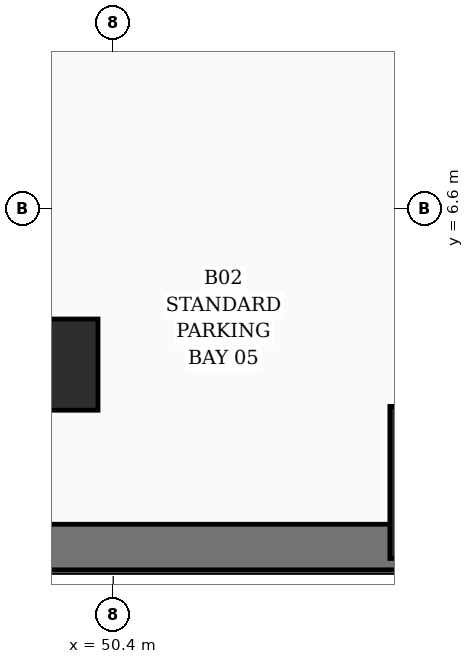
"""IFC4 building model, lengths in metres.
Left out: names, types, materials, properties, quantities, classifications, styles, units other than length and angle.
Written with IfcOpenShell. Run it as: python <this file> out.ifc"""

import sys

from ifc_helpers import new_model, si_unit, direction, frame, frame_2d, origin, origin_2d, place, context, subcontext, project, spatial, rectangle, circle, extrude, element, save


model = new_model("IFC4")
c1 = context("Model", 3, precision=1e-05, world=origin(), true_north=direction((0.0, 1.0)))
c2 = subcontext(c1, "Body", "Model", "MODEL_VIEW")
j1 = project(units=[si_unit("LENGTHUNIT", "METRE"), si_unit("PLANEANGLEUNIT", "RADIAN")], contexts=[c1])
p1 = place(None, origin())
s1 = spatial("IfcSite", under=j1, at=p1, CompositionType="ELEMENT")
p2 = place(p1, origin())
s2 = spatial("IfcBuilding", under=s1, at=p2, CompositionType="ELEMENT")
p3 = place(p2, frame((0.0, 0.0, -9.0)))
s3 = spatial("IfcBuildingStorey", under=s2, at=p3, CompositionType="ELEMENT", Elevation=-9.0)
p4 = place(p3, frame((45.303, 2.15, 0.0), z_axis=(0.0, 0.0, 1.0), x_axis=(1.0, 0.0, 0.0)))
e1 = element("IfcWall", 1, at=p4, inside=s3, PredefinedType="USERDEFINED", context=c2, shape_type="SweptSolid", body=[
    extrude(rectangle(XDim=9.173, YDim=0.6, at=frame_2d((4.586, 0.0))), origin(), (0.0, 0.0, 1.0), 4.5),
])
p5 = place(p3, frame((49.6, 4.55, 0.0), z_axis=(0.0, 0.0, 1.0), x_axis=(1.0, 0.0, 0.0)))
e2 = element("IfcColumn", 2, at=p5, inside=s3, PredefinedType="COLUMN", context=c2, shape_type="SweptSolid", body=[
    extrude(rectangle(XDim=1.2, YDim=1.2, at=origin_2d()), origin(), (0.0, 0.0, 1.0), 4.5),
])
p6 = place(p3, frame((55.04, 3.0, 0.0), z_axis=(0.0, 0.0, 1.0), x_axis=(1.0, 0.0, 0.0)))
e3 = element("IfcColumn", 3, at=p6, inside=s3, PredefinedType="COLUMN", context=c2, shape_type="SweptSolid", body=[
    extrude(circle(Radius=1.0, at=origin_2d()), origin(), (0.0, 0.0, 1.0), 4.5),
])
save(model, sys.argv[1])
